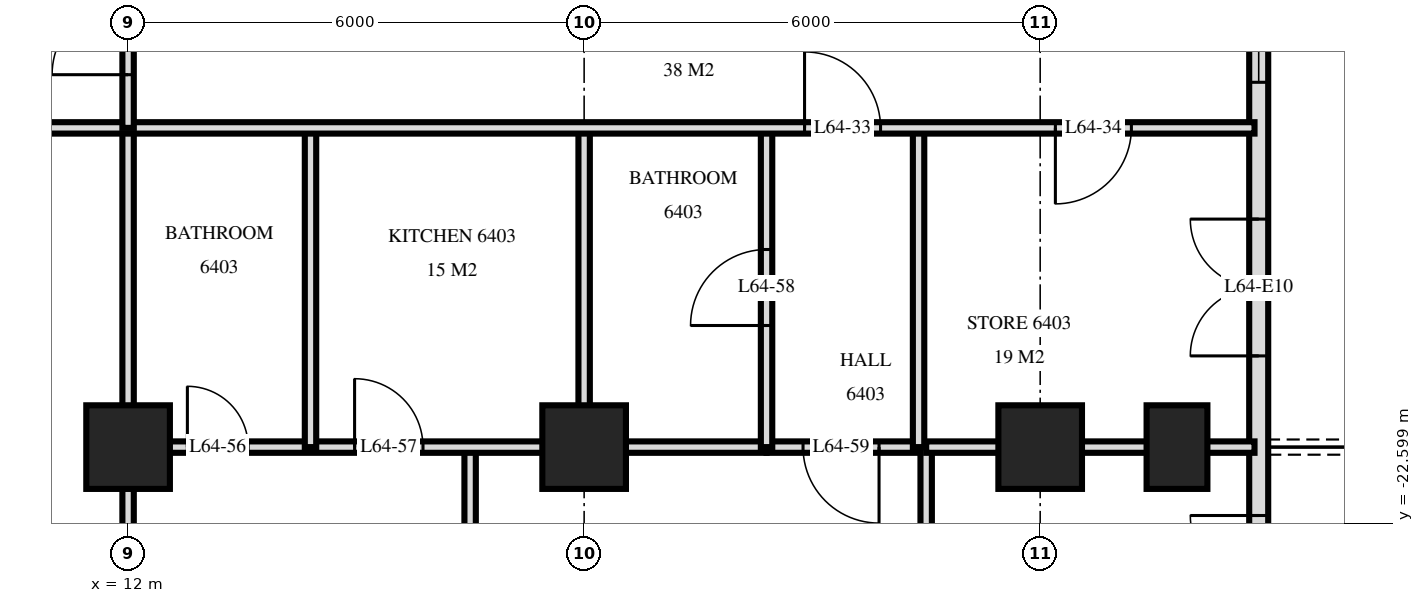
"""IFC4 building model, lengths in metres.
Left out: names, types, materials, properties, quantities, classifications, styles, units other than length and angle.
Written with IfcOpenShell. Run it as: python <this file> out.ifc"""

import sys

from ifc_helpers import new_model, si_unit, direction, frame, frame_2d, origin, origin_2d, place, context, subcontext, project, spatial, rectangle, extrude, element, fill, save


model = new_model("IFC4")
c1 = context("Model", 3, precision=1e-05, world=origin(), true_north=direction((0.0, 1.0)))
c2 = subcontext(c1, "Body", "Model", "MODEL_VIEW")
j1 = project(units=[si_unit("LENGTHUNIT", "METRE"), si_unit("PLANEANGLEUNIT", "RADIAN")], contexts=[c1])
p1 = place(None, origin())
s1 = spatial("IfcSite", under=j1, at=p1, CompositionType="ELEMENT")
p2 = place(p1, origin())
s2 = spatial("IfcBuilding", under=s1, at=p2, CompositionType="ELEMENT")
p3 = place(p2, frame((0.0, 0.0, 243.1)))
s3 = spatial("IfcBuildingStorey", under=s2, at=p3, CompositionType="ELEMENT", Elevation=243.1)
for number, where, z_axis, x_axis in (
    (1, (12.0, -21.6, 0.0), (0.0, 0.0, 1.0), (1.0, 0.0, 0.0)),
    (2, (18.0, -21.6, 0.0), (0.0, 0.0, 1.0), (1.0, 0.0, 0.0)),
    (3, (24.0, -21.6, 0.0), (0.0, 0.0, 1.0), (1.0, 0.0, 0.0)),
):
    element("IfcColumn", number, at=place(p3, frame(where, z_axis=z_axis, x_axis=x_axis)), inside=s3, PredefinedType="COLUMN", context=c2, shape_type="SweptSolid", body=[
        extrude(rectangle(XDim=1.1, YDim=1.1, at=origin_2d()), origin(), (0.0, 0.0, 1.0), 3.5),
    ])
p4 = place(p3, frame((25.8, -21.6, 0.0), z_axis=(0.0, 0.0, 1.0), x_axis=(0.0, 1.0, 0.0)))
e4 = element("IfcColumn", 4, at=p4, inside=s3, PredefinedType="COLUMN", context=c2, shape_type="SweptSolid", body=[
    extrude(rectangle(XDim=1.1, YDim=0.8, at=origin_2d()), origin(), (0.0, 0.0, 1.0), 3.5),
])
p5 = place(p3, frame((26.875, -24.875, 0.0), z_axis=(0.0, 0.0, 1.0), x_axis=(0.0, 1.0, 0.0)))
e5 = element("IfcWall", 5, at=p5, inside=s3, PredefinedType="SOLIDWALL", context=c2, shape_type="SweptSolid", body=[
    extrude(rectangle(XDim=21.551, YDim=0.25, at=frame_2d((10.775, 0.0))), origin(), (0.0, 0.0, 1.0), 3.2),
])
p6 = place(p5, frame((0.575, 0.0, 0.0)))
e6 = element("IfcOpeningElement", 6, at=p6, cuts=e5, PredefinedType="OPENING", context=c2, shape_type="SweptSolid", body=[
    extrude(rectangle(XDim=1.8, YDim=2.4, at=frame_2d((0.9, 1.2))), frame((0.0, 0.135, 0.0), z_axis=(0.0, -1.0, 0.0), x_axis=(1.0, 0.0, 0.0)), (0.0, 0.0, 1.0), 0.27),
])
p7 = place(p5, frame((4.475, 0.0, 0.0)))
e7 = element("IfcOpeningElement", 7, at=p7, cuts=e5, PredefinedType="OPENING", context=c2, shape_type="SweptSolid", body=[
    extrude(rectangle(XDim=1.8, YDim=2.4, at=frame_2d((0.9, 1.2))), frame((0.0, 0.135, 0.0), z_axis=(0.0, -1.0, 0.0), x_axis=(1.0, 0.0, 0.0)), (0.0, 0.0, 1.0), 0.27),
])
p8 = place(p5, frame((8.075, 0.0, 0.9)))
e8 = element("IfcOpeningElement", 8, at=p8, cuts=e5, PredefinedType="OPENING", context=c2, shape_type="SweptSolid", body=[
    extrude(rectangle(XDim=1.2, YDim=1.5, at=frame_2d((0.6, 0.75))), frame((0.0, 0.135, 0.0), z_axis=(0.0, -1.0, 0.0), x_axis=(1.0, 0.0, 0.0)), (0.0, 0.0, 1.0), 0.27),
])
p9 = place(p5, frame((12.225, 0.0, 0.0)))
e9 = element("IfcOpeningElement", 9, at=p9, cuts=e5, PredefinedType="OPENING", context=c2, shape_type="SweptSolid", body=[
    extrude(rectangle(XDim=1.8, YDim=2.4, at=frame_2d((0.9, 1.2))), frame((0.0, 0.135, 0.0), z_axis=(0.0, -1.0, 0.0), x_axis=(1.0, 0.0, 0.0)), (0.0, 0.0, 1.0), 0.27),
])
p10 = place(p3, frame((22.5, -29.217, 0.0), z_axis=(0.0, 0.0, 1.0), x_axis=(0.0, 1.0, 0.0)))
e10 = element("IfcWall", 10, at=p10, inside=s3, PredefinedType="PARTITIONING", context=c2, shape_type="SweptSolid", body=[
    extrude(rectangle(XDim=7.616, YDim=0.15, at=frame_2d((3.808, 0.0))), origin(), (0.0, 0.0, 1.0), 3.22),
])
p11 = place(p10, frame((3.247, 0.0, 0.0)))
e11 = element("IfcOpeningElement", 11, at=p11, cuts=e10, PredefinedType="OPENING", context=c2, shape_type="SweptSolid", body=[
    extrude(rectangle(XDim=0.9, YDim=2.1, at=frame_2d((0.45, 1.05))), frame((0.0, 0.085, 0.0), z_axis=(0.0, -1.0, 0.0), x_axis=(1.0, 0.0, 0.0)), (0.0, 0.0, 1.0), 0.17),
])
p12 = place(p3, frame((22.4, -21.6, 0.0), z_axis=(0.0, 0.0, 1.0), x_axis=(0.0, 1.0, 0.0)))
e12 = element("IfcWall", 12, at=p12, inside=s3, PredefinedType="PARTITIONING", context=c2, shape_type="SweptSolid", body=[
    extrude(rectangle(XDim=4.2, YDim=0.15, at=frame_2d((2.1, 0.0))), origin(), (0.0, 0.0, 1.0), 3.22),
])
p13 = place(p3, frame((20.4, -21.6, 0.0), z_axis=(0.0, 0.0, 1.0), x_axis=(0.0, 1.0, 0.0)))
e13 = element("IfcWall", 13, at=p13, inside=s3, PredefinedType="PARTITIONING", context=c2, shape_type="SweptSolid", body=[
    extrude(rectangle(XDim=4.2, YDim=0.15, at=frame_2d((2.1, 0.0))), origin(), (0.0, 0.0, 1.0), 3.22),
])
p14 = place(p13, frame((1.6, 0.0, 0.0)))
e14 = element("IfcOpeningElement", 14, at=p14, cuts=e13, PredefinedType="OPENING", context=c2, shape_type="SweptSolid", body=[
    extrude(rectangle(XDim=1.0, YDim=2.1, at=frame_2d((0.5, 1.05))), frame((0.0, 0.085, 0.0), z_axis=(0.0, -1.0, 0.0), x_axis=(1.0, 0.0, 0.0)), (0.0, 0.0, 1.0), 0.17),
])
p15 = place(p3, frame((18.0, -21.6, 0.0), z_axis=(0.0, 0.0, 1.0), x_axis=(0.0, 1.0, 0.0)))
e15 = element("IfcWall", 15, at=p15, inside=s3, PredefinedType="PARTITIONING", context=c2, shape_type="SweptSolid", body=[
    extrude(rectangle(XDim=4.2, YDim=0.15, at=frame_2d((2.1, 0.0))), origin(), (0.0, 0.0, 1.0), 3.22),
])
p16 = place(p3, frame((16.5, -29.22, 0.0), z_axis=(0.0, 0.0, 1.0), x_axis=(0.0, 1.0, 0.0)))
e16 = element("IfcWall", 16, at=p16, inside=s3, PredefinedType="PARTITIONING", context=c2, shape_type="SweptSolid", body=[
    extrude(rectangle(XDim=7.62, YDim=0.15, at=frame_2d((3.81, 0.0))), origin(), (0.0, 0.0, 1.0), 3.22),
])
p17 = place(p16, frame((3.29, 0.0, 0.0)))
e17 = element("IfcOpeningElement", 17, at=p17, cuts=e16, PredefinedType="OPENING", context=c2, shape_type="SweptSolid", body=[
    extrude(rectangle(XDim=0.9, YDim=2.1, at=frame_2d((0.45, 1.05))), frame((0.0, 0.085, 0.0), z_axis=(0.0, -1.0, 0.0), x_axis=(1.0, 0.0, 0.0)), (0.0, 0.0, 1.0), 0.17),
])
p18 = place(p3, frame((14.4, -21.6, 0.0), z_axis=(0.0, 0.0, 1.0), x_axis=(0.0, 1.0, 0.0)))
e18 = element("IfcWall", 18, at=p18, inside=s3, PredefinedType="PARTITIONING", context=c2, shape_type="SweptSolid", body=[
    extrude(rectangle(XDim=4.2, YDim=0.15, at=frame_2d((2.1, 0.0))), origin(), (0.0, 0.0, 1.0), 3.22),
])
p19 = place(p3, frame((12.0, -17.4, 0.0), z_axis=(0.0, 0.0, 1.0), x_axis=(0.0, 1.0, 0.0)))
e19 = element("IfcWall", 19, at=p19, inside=s3, PredefinedType="PARTITIONING", context=c2, shape_type="SweptSolid", body=[
    extrude(rectangle(XDim=2.35, YDim=0.15, at=frame_2d((1.175, 0.0))), origin(), (0.0, 0.0, 1.0), 3.22),
])
p20 = place(p19, frame((0.7, 0.0, 0.0)))
e20 = element("IfcOpeningElement", 20, at=p20, cuts=e19, PredefinedType="OPENING", context=c2, shape_type="SweptSolid", body=[
    extrude(rectangle(XDim=1.0, YDim=2.1, at=frame_2d((0.5, 1.05))), frame((0.0, 0.085, 0.0), z_axis=(0.0, -1.0, 0.0), x_axis=(1.0, 0.0, 0.0)), (0.0, 0.0, 1.0), 0.17),
])
p21 = place(p3, frame((12.0, -29.22, 0.0), z_axis=(0.0, 0.0, 1.0), x_axis=(0.0, 1.0, 0.0)))
e21 = element("IfcWall", 21, at=p21, inside=s3, PredefinedType="PARTITIONING", context=c2, shape_type="SweptSolid", body=[
    extrude(rectangle(XDim=11.82, YDim=0.15, at=frame_2d((5.91, 0.0))), origin(), (0.0, 0.0, 1.0), 3.22),
])
p22 = place(p3, frame((20.4, -21.6, 0.0), z_axis=(0.0, 0.0, 1.0), x_axis=(1.0, 0.0, 0.0)))
e22 = element("IfcWall", 22, at=p22, inside=s3, PredefinedType="PARTITIONING", context=c2, shape_type="SweptSolid", body=[
    extrude(rectangle(XDim=2.0, YDim=0.15, at=frame_2d((1.0, 0.0))), origin(), (0.0, 0.0, 1.0), 3.22),
])
p23 = place(p22, frame((0.48, 0.0, 0.0)))
e23 = element("IfcOpeningElement", 23, at=p23, cuts=e22, PredefinedType="OPENING", context=c2, shape_type="SweptSolid", body=[
    extrude(rectangle(XDim=1.0, YDim=2.1, at=frame_2d((0.5, 1.05))), frame((0.0, 0.085, 0.0), z_axis=(0.0, -1.0, 0.0), x_axis=(1.0, 0.0, 0.0)), (0.0, 0.0, 1.0), 0.17),
])
p24 = place(p3, frame((12.0, -21.6, 0.0), z_axis=(0.0, 0.0, 1.0), x_axis=(1.0, 0.0, 0.0)))
e24 = element("IfcWall", 24, at=p24, inside=s3, PredefinedType="PARTITIONING", context=c2, shape_type="SweptSolid", body=[
    extrude(rectangle(XDim=8.4, YDim=0.15, at=frame_2d((4.2, 0.0))), origin(), (0.0, 0.0, 1.0), 3.22),
])
p25 = place(p24, frame((0.78, 0.0, 0.0)))
e25 = element("IfcOpeningElement", 25, at=p25, cuts=e24, PredefinedType="OPENING", context=c2, shape_type="SweptSolid", body=[
    extrude(rectangle(XDim=0.8, YDim=2.1, at=frame_2d((0.4, 1.05))), frame((0.0, 0.085, 0.0), z_axis=(0.0, -1.0, 0.0), x_axis=(1.0, 0.0, 0.0)), (0.0, 0.0, 1.0), 0.17),
])
p26 = place(p24, frame((2.98, 0.0, 0.0)))
e26 = element("IfcOpeningElement", 26, at=p26, cuts=e24, PredefinedType="OPENING", context=c2, shape_type="SweptSolid", body=[
    extrude(rectangle(XDim=0.9, YDim=2.1, at=frame_2d((0.45, 1.05))), frame((0.0, 0.085, 0.0), z_axis=(0.0, -1.0, 0.0), x_axis=(1.0, 0.0, 0.0)), (0.0, 0.0, 1.0), 0.17),
])
p27 = place(p3, frame((22.5, -21.6, 0.0), z_axis=(0.0, 0.0, 1.0), x_axis=(1.0, 0.0, 0.0)))
e27 = element("IfcWall", 27, at=p27, inside=s3, PredefinedType="PARTITIONING", context=c2, shape_type="SweptSolid", body=[
    extrude(rectangle(XDim=4.32, YDim=0.15, at=frame_2d((2.16, 0.0))), origin(), (0.0, 0.0, 1.0), 3.22),
])
p28 = place(p3, frame((-26.82, -17.4, 0.0), z_axis=(0.0, 0.0, 1.0), x_axis=(1.0, 0.0, 0.0)))
e28 = element("IfcWall", 28, at=p28, inside=s3, PredefinedType="PARTITIONING", context=c2, shape_type="SweptSolid", body=[
    extrude(rectangle(XDim=53.64, YDim=0.15, at=frame_2d((26.82, 0.0))), origin(), (0.0, 0.0, 1.0), 3.22),
])
p29 = place(p28, frame((11.97, 0.0, 0.0)))
e29 = element("IfcOpeningElement", 29, at=p29, cuts=e28, PredefinedType="OPENING", context=c2, shape_type="SweptSolid", body=[
    extrude(rectangle(XDim=1.0, YDim=2.1, at=frame_2d((0.5, 1.05))), frame((0.0, 0.085, 0.0), z_axis=(0.0, -1.0, 0.0), x_axis=(1.0, 0.0, 0.0)), (0.0, 0.0, 1.0), 0.17),
])
p30 = place(p28, frame((3.92, 0.0, 0.0)))
e30 = element("IfcOpeningElement", 30, at=p30, cuts=e28, PredefinedType="OPENING", context=c2, shape_type="SweptSolid", body=[
    extrude(rectangle(XDim=1.0, YDim=2.1, at=frame_2d((0.5, 1.05))), frame((0.0, 0.085, 0.0), z_axis=(0.0, -1.0, 0.0), x_axis=(1.0, 0.0, 0.0)), (0.0, 0.0, 1.0), 0.17),
])
p31 = place(p28, frame((5.72, 0.0, 0.0)))
e31 = element("IfcOpeningElement", 31, at=p31, cuts=e28, PredefinedType="OPENING", context=c2, shape_type="SweptSolid", body=[
    extrude(rectangle(XDim=1.0, YDim=2.1, at=frame_2d((0.5, 1.05))), frame((0.0, 0.085, 0.0), z_axis=(0.0, -1.0, 0.0), x_axis=(1.0, 0.0, 0.0)), (0.0, 0.0, 1.0), 0.17),
])
p32 = place(p28, frame((47.72, 0.0, 0.0)))
e32 = element("IfcOpeningElement", 32, at=p32, cuts=e28, PredefinedType="OPENING", context=c2, shape_type="SweptSolid", body=[
    extrude(rectangle(XDim=1.0, YDim=2.1, at=frame_2d((0.5, 1.05))), frame((0.0, 0.085, 0.0), z_axis=(0.0, -1.0, 0.0), x_axis=(1.0, 0.0, 0.0)), (0.0, 0.0, 1.0), 0.17),
])
p33 = place(p28, frame((51.02, 0.0, 0.0)))
e33 = element("IfcOpeningElement", 33, at=p33, cuts=e28, PredefinedType="OPENING", context=c2, shape_type="SweptSolid", body=[
    extrude(rectangle(XDim=1.0, YDim=2.1, at=frame_2d((0.5, 1.05))), frame((0.0, 0.085, 0.0), z_axis=(0.0, -1.0, 0.0), x_axis=(1.0, 0.0, 0.0)), (0.0, 0.0, 1.0), 0.17),
])
p34 = place(p28, frame((17.32, 0.0, 0.0)))
e34 = element("IfcOpeningElement", 34, at=p34, cuts=e28, PredefinedType="OPENING", context=c2, shape_type="SweptSolid", body=[
    extrude(rectangle(XDim=1.0, YDim=2.1, at=frame_2d((0.5, 1.05))), frame((0.0, 0.085, 0.0), z_axis=(0.0, -1.0, 0.0), x_axis=(1.0, 0.0, 0.0)), (0.0, 0.0, 1.0), 0.17),
])
p35 = place(p28, frame((23.32, 0.0, 0.0)))
e35 = element("IfcOpeningElement", 35, at=p35, cuts=e28, PredefinedType="OPENING", context=c2, shape_type="SweptSolid", body=[
    extrude(rectangle(XDim=1.0, YDim=2.1, at=frame_2d((0.5, 1.05))), frame((0.0, 0.085, 0.0), z_axis=(0.0, -1.0, 0.0), x_axis=(1.0, 0.0, 0.0)), (0.0, 0.0, 1.0), 0.17),
])
p36 = place(p28, frame((29.32, 0.0, 0.0)))
e36 = element("IfcOpeningElement", 36, at=p36, cuts=e28, PredefinedType="OPENING", context=c2, shape_type="SweptSolid", body=[
    extrude(rectangle(XDim=1.0, YDim=2.1, at=frame_2d((0.5, 1.05))), frame((0.0, 0.085, 0.0), z_axis=(0.0, -1.0, 0.0), x_axis=(1.0, 0.0, 0.0)), (0.0, 0.0, 1.0), 0.17),
])
p37 = place(p28, frame((35.32, 0.0, 0.0)))
e37 = element("IfcOpeningElement", 37, at=p37, cuts=e28, PredefinedType="OPENING", context=c2, shape_type="SweptSolid", body=[
    extrude(rectangle(XDim=1.0, YDim=2.1, at=frame_2d((0.5, 1.05))), frame((0.0, 0.085, 0.0), z_axis=(0.0, -1.0, 0.0), x_axis=(1.0, 0.0, 0.0)), (0.0, 0.0, 1.0), 0.17),
])
p38 = place(p6, origin())
e38 = element("IfcDoor", 38, at=p38, inside=s3, OperationType="DOUBLE_DOOR_SINGLE_SWING", PredefinedType="DOOR", context=c2, shape_type="SweptSolid", body=[
    extrude(rectangle(XDim=1.8, YDim=2.4, at=frame_2d((0.9, 1.2))), frame((0.0, 0.025, 0.0), z_axis=(0.0, -1.0, 0.0), x_axis=(1.0, 0.0, 0.0)), (0.0, 0.0, 1.0), 0.05),
])
fill(e6, e38)
p39 = place(p7, origin())
e39 = element("IfcDoor", 39, at=p39, inside=s3, OperationType="DOUBLE_DOOR_SINGLE_SWING", PredefinedType="DOOR", context=c2, shape_type="SweptSolid", body=[
    extrude(rectangle(XDim=1.8, YDim=2.4, at=frame_2d((0.9, 1.2))), frame((0.0, 0.025, 0.0), z_axis=(0.0, -1.0, 0.0), x_axis=(1.0, 0.0, 0.0)), (0.0, 0.0, 1.0), 0.05),
])
fill(e7, e39)
p40 = place(p8, origin())
e40 = element("IfcWindow", 40, at=p40, inside=s3, PartitioningType="SINGLE_PANEL", PredefinedType="WINDOW", context=c2, shape_type="SweptSolid", body=[
    extrude(rectangle(XDim=1.2, YDim=1.5, at=frame_2d((0.6, 0.75))), frame((0.0, 0.03, 0.0), z_axis=(0.0, -1.0, 0.0), x_axis=(1.0, 0.0, 0.0)), (0.0, 0.0, 1.0), 0.06),
])
fill(e8, e40)
p41 = place(p20, origin())
e41 = element("IfcDoor", 41, at=p41, inside=s3, OperationType="SINGLE_SWING_RIGHT", PredefinedType="DOOR", context=c2, shape_type="SweptSolid", body=[
    extrude(rectangle(XDim=1.0, YDim=2.1, at=frame_2d((0.5, 1.05))), frame((0.0, 0.025, 0.0), z_axis=(0.0, -1.0, 0.0), x_axis=(1.0, 0.0, 0.0)), (0.0, 0.0, 1.0), 0.05),
])
fill(e20, e41)
p42 = place(p32, origin())
e42 = element("IfcDoor", 42, at=p42, inside=s3, OperationType="SINGLE_SWING_RIGHT", PredefinedType="DOOR", context=c2, shape_type="SweptSolid", body=[
    extrude(rectangle(XDim=1.0, YDim=2.1, at=frame_2d((0.5, 1.05))), frame((0.0, 0.025, 0.0), z_axis=(0.0, -1.0, 0.0), x_axis=(1.0, 0.0, 0.0)), (0.0, 0.0, 1.0), 0.05),
])
fill(e32, e42)
p43 = place(p33, frame((0.5, 0.0, 0.0), z_axis=(0.0, 0.0, 1.0), x_axis=(-1.0, 0.0, 0.0)))
e43 = element("IfcDoor", 43, at=p43, inside=s3, OperationType="SINGLE_SWING_LEFT", PredefinedType="DOOR", context=c2, shape_type="SweptSolid", body=[
    extrude(rectangle(XDim=1.0, YDim=2.1, at=frame_2d((0.0, 1.05))), frame((0.0, -0.025, 0.0), z_axis=(0.0, 1.0, 0.0), x_axis=(-1.0, 0.0, 0.0)), (0.0, 0.0, 1.0), 0.05),
])
fill(e33, e43)
p44 = place(p25, origin())
e44 = element("IfcDoor", 44, at=p44, inside=s3, OperationType="SINGLE_SWING_RIGHT", PredefinedType="DOOR", context=c2, shape_type="SweptSolid", body=[
    extrude(rectangle(XDim=0.8, YDim=2.1, at=frame_2d((0.4, 1.05))), frame((0.0, 0.025, 0.0), z_axis=(0.0, -1.0, 0.0), x_axis=(1.0, 0.0, 0.0)), (0.0, 0.0, 1.0), 0.05),
])
fill(e25, e44)
p45 = place(p26, origin())
e45 = element("IfcDoor", 45, at=p45, inside=s3, OperationType="SINGLE_SWING_RIGHT", PredefinedType="DOOR", context=c2, shape_type="SweptSolid", body=[
    extrude(rectangle(XDim=0.9, YDim=2.1, at=frame_2d((0.45, 1.05))), frame((0.0, 0.025, 0.0), z_axis=(0.0, -1.0, 0.0), x_axis=(1.0, 0.0, 0.0)), (0.0, 0.0, 1.0), 0.05),
])
fill(e26, e45)
p46 = place(p14, origin())
e46 = element("IfcDoor", 46, at=p46, inside=s3, OperationType="SINGLE_SWING_RIGHT", PredefinedType="DOOR", context=c2, shape_type="SweptSolid", body=[
    extrude(rectangle(XDim=1.0, YDim=2.1, at=frame_2d((0.5, 1.05))), frame((0.0, 0.025, 0.0), z_axis=(0.0, -1.0, 0.0), x_axis=(1.0, 0.0, 0.0)), (0.0, 0.0, 1.0), 0.05),
])
fill(e14, e46)
p47 = place(p23, frame((0.5, 0.0, 0.0), z_axis=(0.0, 0.0, 1.0), x_axis=(-1.0, 0.0, 0.0)))
e47 = element("IfcDoor", 47, at=p47, inside=s3, OperationType="SINGLE_SWING_RIGHT", PredefinedType="DOOR", context=c2, shape_type="SweptSolid", body=[
    extrude(rectangle(XDim=1.0, YDim=2.1, at=frame_2d((0.0, 1.05))), frame((0.0, -0.025, 0.0), z_axis=(0.0, 1.0, 0.0), x_axis=(-1.0, 0.0, 0.0)), (0.0, 0.0, 1.0), 0.05),
])
fill(e23, e47)
save(model, sys.argv[1])
